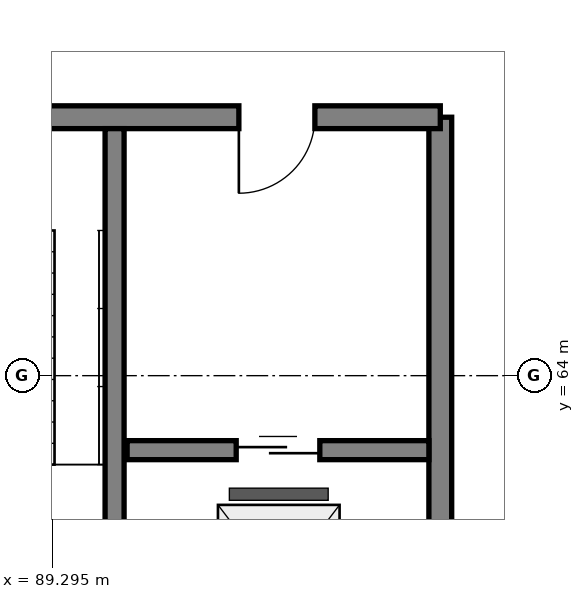
"""IFC4 building model, lengths in metres.
Left out: names, types, materials, properties, quantities, classifications, styles, units other than length and angle.
Written with IfcOpenShell. Run it as: python <this file> out.ifc"""

import sys

from ifc_helpers import new_model, si_unit, direction, frame, frame_2d, origin, place, context, subcontext, project, spatial, rectangle, extrude, element, fill, save


model = new_model("IFC4")
c1 = context("Model", 3, precision=1e-05, world=origin(), true_north=direction((0.0, 1.0)))
c2 = subcontext(c1, "Body", "Model", "MODEL_VIEW")
j1 = project(units=[si_unit("LENGTHUNIT", "METRE"), si_unit("PLANEANGLEUNIT", "RADIAN")], contexts=[c1])
p1 = place(None, origin())
s1 = spatial("IfcSite", under=j1, at=p1, CompositionType="ELEMENT")
p2 = place(p1, origin())
s2 = spatial("IfcBuilding", under=s1, at=p2, CompositionType="ELEMENT")
p3 = place(p2, frame((0.0, 0.0, -4.5)))
s3 = spatial("IfcBuildingStorey", under=s2, at=p3, CompositionType="ELEMENT", Elevation=-4.5)
p4 = place(p3, frame((94.4, 59.4, 0.0), z_axis=(0.0, 0.0, 1.0), x_axis=(0.0, 1.0, 0.0)))
e1 = element("IfcWall", 1, at=p4, inside=s3, PredefinedType="SHEAR", context=c2, shape_type="SweptSolid", body=[
    extrude(rectangle(XDim=8.0, YDim=0.3, at=frame_2d((4.0, 0.0), x_axis=(1.0, 0.0))), origin(), (0.0, 0.0, 1.0), 4.5),
])
p5 = place(p3, frame((94.4, 67.4, 0.0), z_axis=(0.0, 0.0, 1.0), x_axis=(-1.0, 0.0, 0.0)))
e2 = element("IfcWall", 2, at=p5, inside=s3, PredefinedType="SHEAR", context=c2, shape_type="SweptSolid", body=[
    extrude(rectangle(XDim=7.4, YDim=0.3, at=frame_2d((3.7, 0.0), x_axis=(1.0, 0.0))), origin(), (0.0, 0.0, 1.0), 4.5),
])
p6 = place(p5, frame((1.65, 0.0, 0.0)))
e3 = element("IfcOpeningElement", 3, at=p6, cuts=e2, PredefinedType="OPENING", context=c2, shape_type="SweptSolid", body=[
    extrude(rectangle(XDim=1.0, YDim=2.15, at=frame_2d((0.5, 1.075), x_axis=(1.0, 0.0))), frame((0.0, 0.16, 0.0), z_axis=(0.0, -1.0, 0.0), x_axis=(1.0, 0.0, 0.0)), (0.0, 0.0, 1.0), 0.32),
])
p7 = place(p5, frame((5.3, 0.0, 0.0)))
e4 = element("IfcOpeningElement", 4, at=p7, cuts=e2, PredefinedType="OPENING", context=c2, shape_type="SweptSolid", body=[
    extrude(rectangle(XDim=1.0, YDim=2.15, at=frame_2d((0.5, 1.075), x_axis=(1.0, 0.0))), frame((0.0, 0.16, 0.0), z_axis=(0.0, -1.0, 0.0), x_axis=(1.0, 0.0, 0.0)), (0.0, 0.0, 1.0), 0.32),
])
p8 = place(p3, frame((90.115, 59.55, 0.0), z_axis=(0.0, 0.0, 1.0), x_axis=(0.0, 1.0, 0.0)))
e5 = element("IfcWall", 5, at=p8, inside=s3, PredefinedType="SHEAR", context=c2, shape_type="SweptSolid", body=[
    extrude(rectangle(XDim=7.7, YDim=0.25, at=frame_2d((3.85, 0.0), x_axis=(1.0, 0.0))), origin(), (0.0, 0.0, 1.0), 4.5),
])
p9 = place(p3, frame((90.28, 63.02, 0.0), z_axis=(0.0, 0.0, 1.0), x_axis=(1.0, 0.0, 0.0)))
e6 = element("IfcWall", 6, at=p9, inside=s3, PredefinedType="SHEAR", context=c2, shape_type="SweptSolid", body=[
    extrude(rectangle(XDim=3.97, YDim=0.25, at=frame_2d((1.985, 0.0), x_axis=(1.0, 0.0))), origin(), (0.0, 0.0, 1.0), 4.2),
])
p10 = place(p9, frame((1.435, 0.0, 0.0)))
e7 = element("IfcOpeningElement", 7, at=p10, cuts=e6, PredefinedType="OPENING", context=c2, shape_type="SweptSolid", body=[
    extrude(rectangle(XDim=1.1, YDim=2.15, at=frame_2d((0.55, 1.075), x_axis=(1.0, 0.0))), frame((0.0, 0.135, 0.0), z_axis=(0.0, -1.0, 0.0), x_axis=(1.0, 0.0, 0.0)), (0.0, 0.0, 1.0), 0.27),
])
p11 = place(p6, origin())
e8 = element("IfcDoor", 8, at=p11, inside=s3, OperationType="SINGLE_SWING_RIGHT", PredefinedType="DOOR", context=c2, shape_type="SweptSolid", body=[
    extrude(rectangle(XDim=1.0, YDim=2.15, at=frame_2d((0.5, 1.075), x_axis=(1.0, 0.0))), frame((0.0, 0.025, 0.0), z_axis=(0.0, -1.0, 0.0), x_axis=(1.0, 0.0, 0.0)), (0.0, 0.0, 1.0), 0.05),
])
fill(e3, e8)
p12 = place(p10, origin())
e9 = element("IfcDoor", 9, at=p12, inside=s3, OperationType="SLIDING_TO_LEFT", PredefinedType="DOOR", context=c2, shape_type="SweptSolid", body=[
    extrude(rectangle(XDim=1.1, YDim=2.15, at=frame_2d((0.55, 1.075), x_axis=(1.0, 0.0))), frame((0.0, 0.025, 0.0), z_axis=(0.0, -1.0, 0.0), x_axis=(1.0, 0.0, 0.0)), (0.0, 0.0, 1.0), 0.05),
])
fill(e7, e9)
save(model, sys.argv[1])
